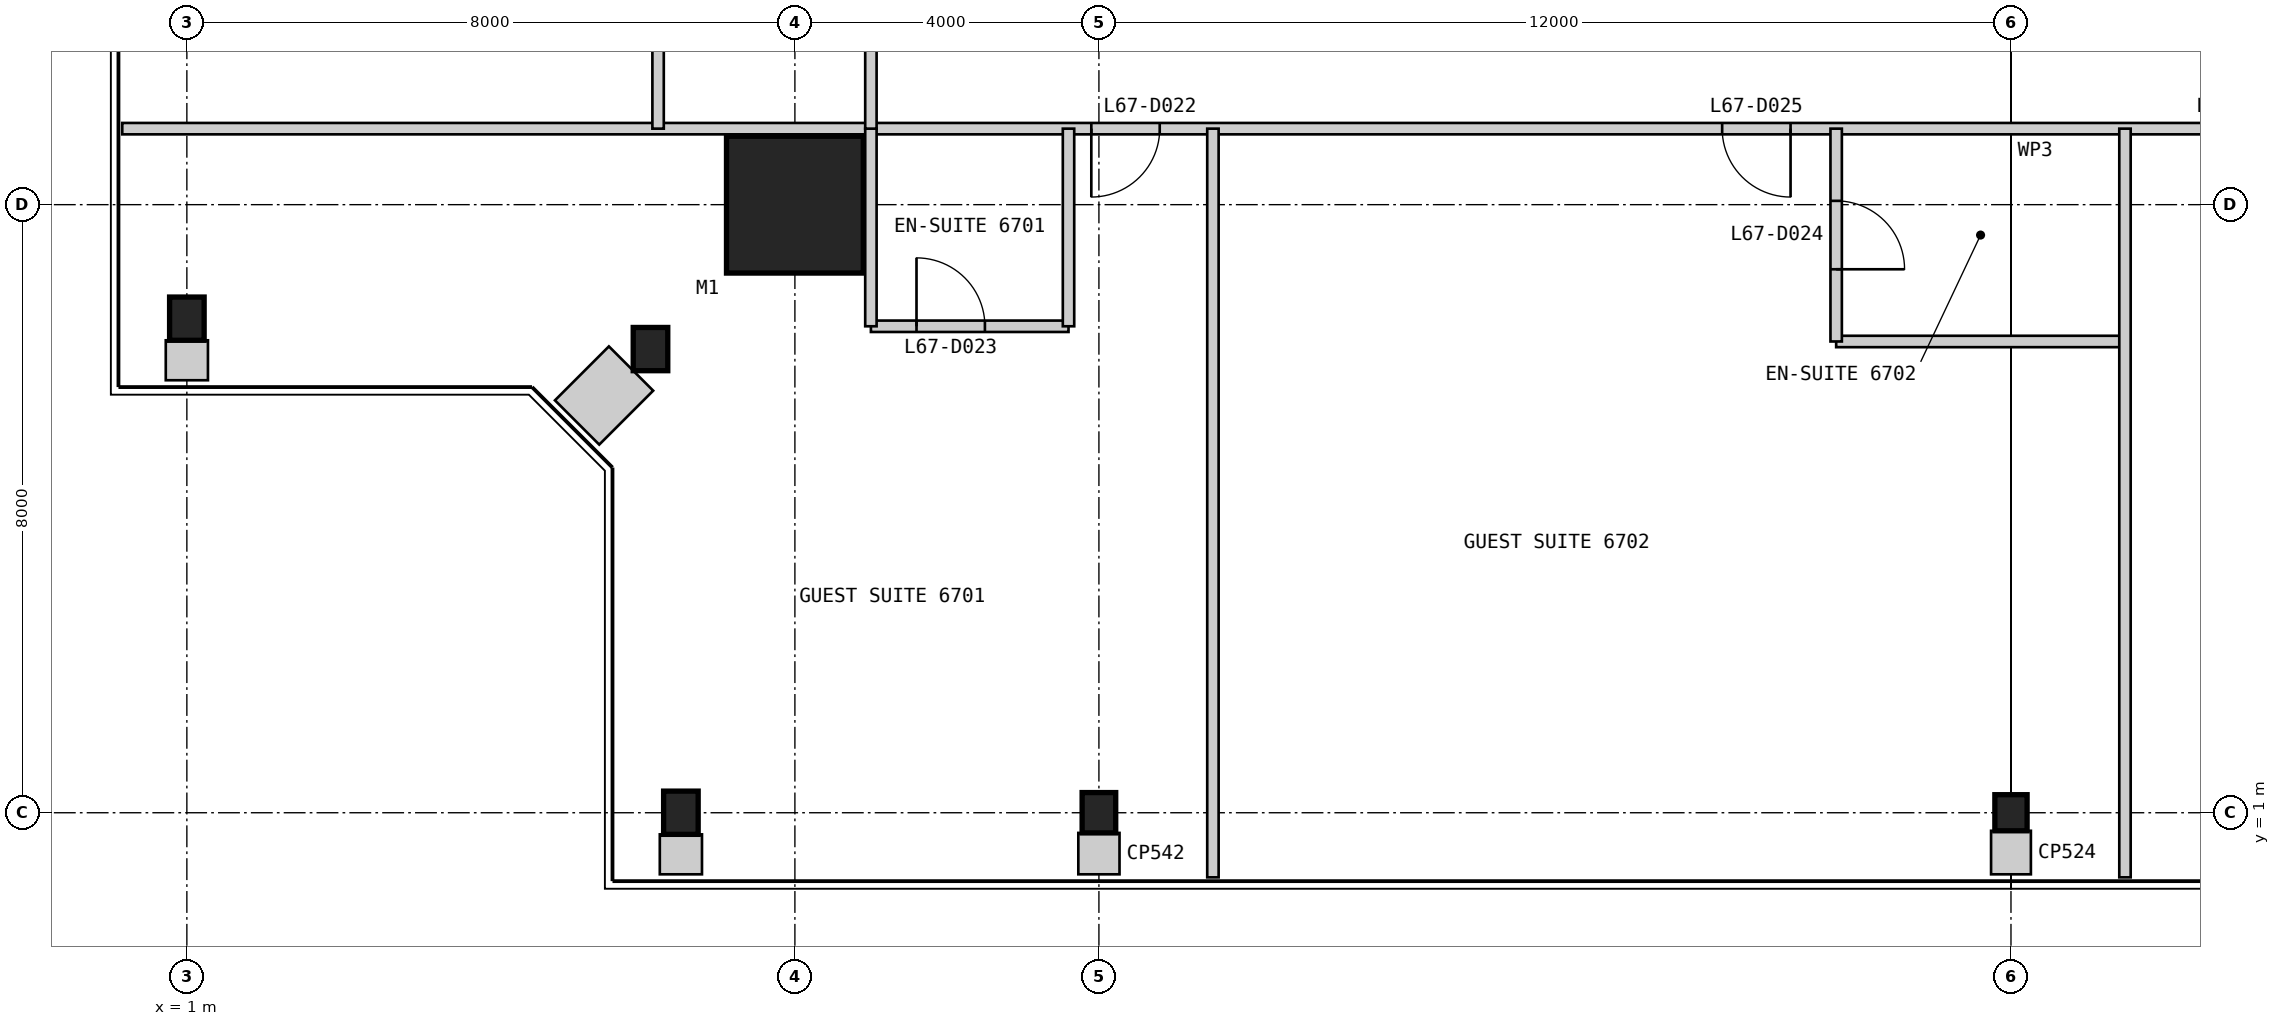
"""IFC4 building model, lengths in metres.
Left out: names, types, materials, properties, quantities, classifications, styles, units other than length and angle.
Written with IfcOpenShell. Run it as: python <this file> out.ifc"""

import sys

from ifc_helpers import new_model, si_unit, direction, frame, frame_2d, origin, origin_2d, place, context, subcontext, project, spatial, rectangle, i_section, extrude, element, fill, save


model = new_model("IFC4")
c1 = context("Model", 3, precision=1e-05, world=origin(), true_north=direction((0.0, 1.0)))
c2 = subcontext(c1, "Body", "Model", "MODEL_VIEW")
j1 = project(units=[si_unit("LENGTHUNIT", "METRE"), si_unit("PLANEANGLEUNIT", "RADIAN")], contexts=[c1])
p1 = place(None, origin())
s1 = spatial("IfcSite", under=j1, at=p1, CompositionType="ELEMENT")
p2 = place(p1, origin())
s2 = spatial("IfcBuilding", under=s1, at=p2, CompositionType="ELEMENT")
p3 = place(p2, frame((0.0, 0.0, 279.8)))
s3 = spatial("IfcBuildingStorey", under=s2, at=p3, CompositionType="ELEMENT", Elevation=279.8)
p4 = place(p3, frame((9.0, 9.0, 0.0), z_axis=(0.0, 0.0, 1.0), x_axis=(1.0, 0.0, 0.0)))
e1 = element("IfcColumn", 1, at=p4, inside=s3, PredefinedType="COLUMN", context=c2, shape_type="SweptSolid", body=[
    extrude(rectangle(XDim=1.8, YDim=1.8, at=origin_2d()), origin(), (0.0, 0.0, 1.0), 3.4),
])
p5 = place(p3, frame((7.5, 1.0, 0.0), z_axis=(0.0, 0.0, 1.0), x_axis=(1.0, 0.0, 0.0)))
e2 = element("IfcColumn", 2, at=p5, inside=s3, PredefinedType="COLUMN", context=c2, shape_type="SweptSolid", body=[
    extrude(i_section(OverallWidth=0.455, OverallDepth=0.569, WebThickness=0.078, FlangeThickness=0.125, at=origin_2d()), origin(), (0.0, 0.0, 1.0), 3.4),
])
p6 = place(p3, frame((13.0, 1.0, 0.0), z_axis=(0.0, 0.0, 1.0), x_axis=(1.0, 0.0, 0.0)))
e3 = element("IfcColumn", 3, at=p6, inside=s3, PredefinedType="COLUMN", context=c2, shape_type="SweptSolid", body=[
    extrude(i_section(OverallWidth=0.442, OverallDepth=0.531, WebThickness=0.066, FlangeThickness=0.106, at=origin_2d()), origin(), (0.0, 0.0, 1.0), 3.4),
])
p7 = place(p3, frame((25.0, 1.0, 0.0), z_axis=(0.0, 0.0, 1.0), x_axis=(1.0, 0.0, 0.0)))
e4 = element("IfcColumn", 4, at=p7, inside=s3, PredefinedType="COLUMN", context=c2, shape_type="SweptSolid", body=[
    extrude(i_section(OverallWidth=0.424, OverallDepth=0.475, WebThickness=0.048, FlangeThickness=0.077, at=origin_2d()), origin(), (0.0, 0.0, 1.0), 3.4),
])
for number, where, z_axis, x_axis in (
    (5, (1.0, 7.5, 0.0), (0.0, 0.0, 1.0), (1.0, 0.0, 0.0)),
    (6, (7.1, 7.1, 0.0), (0.0, 0.0, 1.0), (1.0, 0.0, 0.0)),
):
    element("IfcColumn", number, at=place(p3, frame(where, z_axis=z_axis, x_axis=x_axis)), inside=s3, PredefinedType="COLUMN", context=c2, shape_type="SweptSolid", body=[
        extrude(i_section(OverallWidth=0.455, OverallDepth=0.569, WebThickness=0.078, FlangeThickness=0.125, at=origin_2d()), origin(), (0.0, 0.0, 1.0), 3.4),
    ])
p8 = place(p3, frame((10.0, 10.0, 0.0), z_axis=(0.0, 0.0, 1.0), x_axis=(1.0, 0.0, 0.0)))
e7 = element("IfcWall", 7, at=p8, inside=s3, PredefinedType="PARTITIONING", context=c2, shape_type="SweptSolid", body=[
    extrude(rectangle(XDim=30.0, YDim=0.15, at=frame_2d((15.0, 0.0))), origin(), (0.0, 0.0, 1.0), 3.25),
])
p9 = place(p8, frame((2.9, 0.0, 0.0)))
e8 = element("IfcOpeningElement", 8, at=p9, cuts=e7, PredefinedType="OPENING", context=c2, shape_type="SweptSolid", body=[
    extrude(rectangle(XDim=0.9, YDim=2.1, at=frame_2d((0.45, 1.05))), frame((0.0, 0.085, 0.0), z_axis=(0.0, -1.0, 0.0), x_axis=(1.0, 0.0, 0.0)), (0.0, 0.0, 1.0), 0.17),
])
p10 = place(p8, frame((11.2, 0.0, 0.0)))
e9 = element("IfcOpeningElement", 9, at=p10, cuts=e7, PredefinedType="OPENING", context=c2, shape_type="SweptSolid", body=[
    extrude(rectangle(XDim=0.9, YDim=2.1, at=frame_2d((0.45, 1.05))), frame((0.0, 0.085, 0.0), z_axis=(0.0, -1.0, 0.0), x_axis=(1.0, 0.0, 0.0)), (0.0, 0.0, 1.0), 0.17),
])
p11 = place(p8, frame((17.6, 0.0, 0.0)))
e10 = element("IfcOpeningElement", 10, at=p11, cuts=e7, PredefinedType="OPENING", context=c2, shape_type="SweptSolid", body=[
    extrude(rectangle(XDim=0.9, YDim=2.1, at=frame_2d((0.45, 1.05))), frame((0.0, 0.085, 0.0), z_axis=(0.0, -1.0, 0.0), x_axis=(1.0, 0.0, 0.0)), (0.0, 0.0, 1.0), 0.17),
])
p12 = place(p8, frame((26.3, 0.0, 0.0)))
e11 = element("IfcOpeningElement", 11, at=p12, cuts=e7, PredefinedType="OPENING", context=c2, shape_type="SweptSolid", body=[
    extrude(rectangle(XDim=1.0, YDim=2.1, at=frame_2d((0.5, 1.05))), frame((0.0, 0.085, 0.0), z_axis=(0.0, -1.0, 0.0), x_axis=(1.0, 0.0, 0.0)), (0.0, 0.0, 1.0), 0.17),
])
p13 = place(p3, frame((0.15, 10.0, 0.0), z_axis=(0.0, 0.0, 1.0), x_axis=(1.0, 0.0, 0.0)))
e12 = element("IfcWall", 12, at=p13, inside=s3, PredefinedType="PARTITIONING", context=c2, shape_type="SweptSolid", body=[
    extrude(rectangle(XDim=9.85, YDim=0.15, at=frame_2d((4.925, 0.0))), origin(), (0.0, 0.0, 1.0), 3.25),
])
p14 = place(p3, frame((10.0, 7.4, 0.0), z_axis=(0.0, 0.0, 1.0), x_axis=(1.0, 0.0, 0.0)))
e13 = element("IfcWall", 13, at=p14, inside=s3, PredefinedType="PARTITIONING", context=c2, shape_type="SweptSolid", body=[
    extrude(rectangle(XDim=2.6, YDim=0.15, at=frame_2d((1.3, 0.0))), origin(), (0.0, 0.0, 1.0), 3.25),
])
p15 = place(p14, frame((0.6, 0.0, 0.0)))
e14 = element("IfcOpeningElement", 14, at=p15, cuts=e13, PredefinedType="OPENING", context=c2, shape_type="SweptSolid", body=[
    extrude(rectangle(XDim=0.9, YDim=2.1, at=frame_2d((0.45, 1.05))), frame((0.0, 0.085, 0.0), z_axis=(0.0, -1.0, 0.0), x_axis=(1.0, 0.0, 0.0)), (0.0, 0.0, 1.0), 0.17),
])
for number, where, z_axis, x_axis in (
    (15, (10.0, 7.4, 0.0), (0.0, 0.0, 1.0), (0.0, 1.0, 0.0)),
    (16, (12.6, 7.4, 0.0), (0.0, 0.0, 1.0), (0.0, 1.0, 0.0)),
):
    element("IfcWall", number, at=place(p3, frame(where, z_axis=z_axis, x_axis=x_axis)), inside=s3, PredefinedType="PARTITIONING", context=c2, shape_type="SweptSolid", body=[
        extrude(rectangle(XDim=2.6, YDim=0.15, at=frame_2d((1.3, 0.0))), origin(), (0.0, 0.0, 1.0), 3.25),
    ])
p16 = place(p3, frame((14.5, 0.15, 0.0), z_axis=(0.0, 0.0, 1.0), x_axis=(0.0, 1.0, 0.0)))
e17 = element("IfcWall", 17, at=p16, inside=s3, PredefinedType="PARTITIONING", context=c2, shape_type="SweptSolid", body=[
    extrude(rectangle(XDim=9.85, YDim=0.15, at=frame_2d((4.925, 0.0))), origin(), (0.0, 0.0, 1.0), 3.25),
])
p17 = place(p3, frame((22.7, 7.2, 0.0), z_axis=(0.0, 0.0, 1.0), x_axis=(1.0, 0.0, 0.0)))
e18 = element("IfcWall", 18, at=p17, inside=s3, PredefinedType="PARTITIONING", context=c2, shape_type="SweptSolid", body=[
    extrude(rectangle(XDim=3.8, YDim=0.15, at=frame_2d((1.9, 0.0))), origin(), (0.0, 0.0, 1.0), 3.25),
])
p18 = place(p3, frame((22.7, 7.2, 0.0), z_axis=(0.0, 0.0, 1.0), x_axis=(0.0, 1.0, 0.0)))
e19 = element("IfcWall", 19, at=p18, inside=s3, PredefinedType="PARTITIONING", context=c2, shape_type="SweptSolid", body=[
    extrude(rectangle(XDim=2.8, YDim=0.15, at=frame_2d((1.4, 0.0))), origin(), (0.0, 0.0, 1.0), 3.25),
])
p19 = place(p18, frame((0.95, 0.0, 0.0)))
e20 = element("IfcOpeningElement", 20, at=p19, cuts=e19, PredefinedType="OPENING", context=c2, shape_type="SweptSolid", body=[
    extrude(rectangle(XDim=0.9, YDim=2.1, at=frame_2d((0.45, 1.05))), frame((0.0, 0.085, 0.0), z_axis=(0.0, -1.0, 0.0), x_axis=(1.0, 0.0, 0.0)), (0.0, 0.0, 1.0), 0.17),
])
p20 = place(p3, frame((26.5, 0.15, 0.0), z_axis=(0.0, 0.0, 1.0), x_axis=(0.0, 1.0, 0.0)))
e21 = element("IfcWall", 21, at=p20, inside=s3, PredefinedType="PARTITIONING", context=c2, shape_type="SweptSolid", body=[
    extrude(rectangle(XDim=9.85, YDim=0.15, at=frame_2d((4.925, 0.0))), origin(), (0.0, 0.0, 1.0), 3.25),
])
p21 = place(p3, frame((10.0, 40.0, 0.0), z_axis=(0.0, 0.0, 1.0), x_axis=(0.0, -1.0, 0.0)))
e22 = element("IfcWall", 22, at=p21, inside=s3, PredefinedType="PARTITIONING", context=c2, shape_type="SweptSolid", body=[
    extrude(rectangle(XDim=30.0, YDim=0.15, at=frame_2d((15.0, 0.0))), origin(), (0.0, 0.0, 1.0), 2.638),
])
p22 = place(p21, frame((2.9, 0.0, 0.0)))
e23 = element("IfcOpeningElement", 23, at=p22, cuts=e22, PredefinedType="OPENING", context=c2, shape_type="SweptSolid", body=[
    extrude(rectangle(XDim=0.9, YDim=2.1, at=frame_2d((0.45, 1.05))), frame((0.0, 0.085, 0.0), z_axis=(0.0, -1.0, 0.0), x_axis=(1.0, 0.0, 0.0)), (0.0, 0.0, 1.0), 0.17),
])
p23 = place(p21, frame((11.2, 0.0, 0.0)))
e24 = element("IfcOpeningElement", 24, at=p23, cuts=e22, PredefinedType="OPENING", context=c2, shape_type="SweptSolid", body=[
    extrude(rectangle(XDim=0.9, YDim=2.1, at=frame_2d((0.45, 1.05))), frame((0.0, 0.085, 0.0), z_axis=(0.0, -1.0, 0.0), x_axis=(1.0, 0.0, 0.0)), (0.0, 0.0, 1.0), 0.17),
])
p24 = place(p21, frame((24.7, 0.0, 0.0)))
e25 = element("IfcOpeningElement", 25, at=p24, cuts=e22, PredefinedType="OPENING", context=c2, shape_type="SweptSolid", body=[
    extrude(rectangle(XDim=0.9, YDim=2.1, at=frame_2d((0.45, 1.05))), frame((0.0, 0.085, 0.0), z_axis=(0.0, -1.0, 0.0), x_axis=(1.0, 0.0, 0.0)), (0.0, 0.0, 1.0), 0.17),
])
p25 = place(p3, frame((7.2, 13.8, 0.0), z_axis=(0.0, 0.0, 1.0), x_axis=(0.0, -1.0, 0.0)))
e26 = element("IfcWall", 26, at=p25, inside=s3, PredefinedType="PARTITIONING", context=c2, shape_type="SweptSolid", body=[
    extrude(rectangle(XDim=3.8, YDim=0.15, at=frame_2d((1.9, 0.0))), origin(), (0.0, 0.0, 1.0), 3.25),
])
p26 = place(p3, frame((7.5, 0.19, 0.0), z_axis=(0.0, 0.0, 1.0), x_axis=(0.0, 1.0, 0.0)))
e27 = element("IfcWall", 27, at=p26, inside=s3, PredefinedType="PARTITIONING", context=c2, shape_type="SweptSolid", body=[
    extrude(rectangle(XDim=0.526, YDim=0.555, at=frame_2d((0.263, 0.0))), origin(), (0.0, 0.0, 1.0), 3.25),
])
p27 = place(p3, frame((13.0, 0.19, 0.0), z_axis=(0.0, 0.0, 1.0), x_axis=(0.0, 1.0, 0.0)))
e28 = element("IfcWall", 28, at=p27, inside=s3, PredefinedType="PARTITIONING", context=c2, shape_type="SweptSolid", body=[
    extrude(rectangle(XDim=0.545, YDim=0.542, at=frame_2d((0.272, 0.0))), origin(), (0.0, 0.0, 1.0), 3.25),
])
p28 = place(p3, frame((1.0, 6.69, 0.0), z_axis=(0.0, 0.0, 1.0), x_axis=(0.0, 1.0, 0.0)))
e29 = element("IfcWall", 29, at=p28, inside=s3, PredefinedType="PARTITIONING", context=c2, shape_type="SweptSolid", body=[
    extrude(rectangle(XDim=0.526, YDim=0.555, at=frame_2d((0.263, 0.0))), origin(), (0.0, 0.0, 1.0), 3.25),
])
p29 = place(p3, frame((6.134, 6.134, 0.0), z_axis=(0.0, 0.0, 1.0), x_axis=(0.707106781187, 0.707106781187, 0.0)))
e30 = element("IfcWall", 30, at=p29, inside=s3, PredefinedType="PARTITIONING", context=c2, shape_type="SweptSolid", body=[
    extrude(rectangle(XDim=1.004, YDim=0.824, at=frame_2d((0.502, 0.0))), origin(), (0.0, 0.0, 1.0), 3.25),
])
p30 = place(p3, frame((25.0, 0.19, 0.0), z_axis=(0.0, 0.0, 1.0), x_axis=(0.0, 1.0, 0.0)))
e31 = element("IfcWall", 31, at=p30, inside=s3, PredefinedType="PARTITIONING", context=c2, shape_type="SweptSolid", body=[
    extrude(rectangle(XDim=0.573, YDim=0.524, at=frame_2d((0.286, 0.0))), origin(), (0.0, 0.0, 1.0), 3.25),
])
p31 = place(p9, frame((0.9, 0.0, 0.0), z_axis=(0.0, 0.0, 1.0), x_axis=(-1.0, 0.0, 0.0)))
e32 = element("IfcDoor", 32, at=p31, inside=s3, OperationType="SINGLE_SWING_RIGHT", PredefinedType="DOOR", context=c2, shape_type="SweptSolid", body=[
    extrude(rectangle(XDim=0.9, YDim=2.1, at=frame_2d((0.45, 1.05))), frame((0.0, 0.025, 0.0), z_axis=(0.0, -1.0, 0.0), x_axis=(1.0, 0.0, 0.0)), (0.0, 0.0, 1.0), 0.05),
])
fill(e8, e32)
p32 = place(p15, origin())
e33 = element("IfcDoor", 33, at=p32, inside=s3, OperationType="SINGLE_SWING_LEFT", PredefinedType="DOOR", context=c2, shape_type="SweptSolid", body=[
    extrude(rectangle(XDim=0.9, YDim=2.1, at=frame_2d((0.45, 1.05))), frame((0.0, 0.025, 0.0), z_axis=(0.0, -1.0, 0.0), x_axis=(1.0, 0.0, 0.0)), (0.0, 0.0, 1.0), 0.05),
])
fill(e14, e33)
p33 = place(p19, frame((0.9, 0.0, 0.0), z_axis=(0.0, 0.0, 1.0), x_axis=(-1.0, 0.0, 0.0)))
e34 = element("IfcDoor", 34, at=p33, inside=s3, OperationType="SINGLE_SWING_RIGHT", PredefinedType="DOOR", context=c2, shape_type="SweptSolid", body=[
    extrude(rectangle(XDim=0.9, YDim=2.1, at=frame_2d((0.45, 1.05))), frame((0.0, 0.025, 0.0), z_axis=(0.0, -1.0, 0.0), x_axis=(1.0, 0.0, 0.0)), (0.0, 0.0, 1.0), 0.05),
])
fill(e20, e34)
p34 = place(p10, frame((0.9, 0.0, 0.0), z_axis=(0.0, 0.0, 1.0), x_axis=(-1.0, 0.0, 0.0)))
e35 = element("IfcDoor", 35, at=p34, inside=s3, OperationType="SINGLE_SWING_LEFT", PredefinedType="DOOR", context=c2, shape_type="SweptSolid", body=[
    extrude(rectangle(XDim=0.9, YDim=2.1, at=frame_2d((0.45, 1.05))), frame((0.0, 0.025, 0.0), z_axis=(0.0, -1.0, 0.0), x_axis=(1.0, 0.0, 0.0)), (0.0, 0.0, 1.0), 0.05),
])
fill(e9, e35)
save(model, sys.argv[1])
